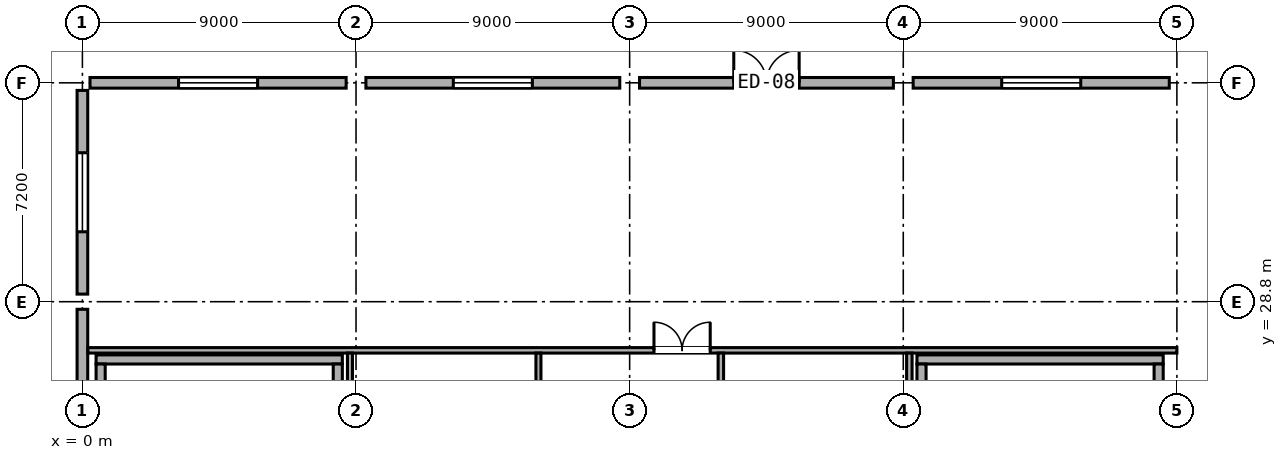
"""IFC4 building model, lengths in metres.
Left out: names, types, materials, properties, quantities, classifications, styles, units other than length and angle.
Written with IfcOpenShell. Run it as: python <this file> out.ifc"""

import sys

from ifc_helpers import new_model, si_unit, direction, frame, frame_2d, origin, origin_2d, place, context, subcontext, project, spatial, rectangle, hollow_rectangle, extrude, element, fill, save


model = new_model("IFC4")
c1 = context("Model", 3, precision=1e-05, world=origin(), true_north=direction((0.0, 1.0)))
c2 = subcontext(c1, "Body", "Model", "MODEL_VIEW")
j1 = project(units=[si_unit("LENGTHUNIT", "METRE"), si_unit("PLANEANGLEUNIT", "RADIAN")], contexts=[c1])
p1 = place(None, origin())
s1 = spatial("IfcSite", under=j1, at=p1, CompositionType="ELEMENT")
p2 = place(p1, origin())
s2 = spatial("IfcBuilding", under=s1, at=p2, CompositionType="ELEMENT")
p3 = place(p2, origin())
s3 = spatial("IfcBuildingStorey", under=s2, at=p3, CompositionType="ELEMENT", Elevation=0.0)
for number, where, z_axis, x_axis in (
    (1, (0.0, 28.8, 0.0), (0.0, 0.0, 1.0), (1.0, 0.0, 0.0)),
    (2, (0.0, 36.0, 0.0), (0.0, 0.0, 1.0), (1.0, 0.0, 0.0)),
):
    element("IfcColumn", number, at=place(p3, frame(where, z_axis=z_axis, x_axis=x_axis)), inside=s3, PredefinedType="COLUMN", context=c2, shape_type="SweptSolid", body=[
        extrude(hollow_rectangle(XDim=0.5, YDim=0.5, WallThickness=0.022, at=origin_2d()), origin(), (0.0, 0.0, 1.0), 4.8),
    ])
for number, where, z_axis, x_axis in (
    (3, (9.0, 28.8, 0.0), (0.0, 0.0, 1.0), (1.0, 0.0, 0.0)),
    (4, (9.0, 36.0, 0.0), (0.0, 0.0, 1.0), (1.0, 0.0, 0.0)),
    (5, (18.0, 28.8, 0.0), (0.0, 0.0, 1.0), (1.0, 0.0, 0.0)),
    (6, (18.0, 36.0, 0.0), (0.0, 0.0, 1.0), (1.0, 0.0, 0.0)),
    (7, (27.0, 28.8, 0.0), (0.0, 0.0, 1.0), (1.0, 0.0, 0.0)),
    (8, (27.0, 36.0, 0.0), (0.0, 0.0, 1.0), (1.0, 0.0, 0.0)),
):
    element("IfcColumn", number, at=place(p3, frame(where, z_axis=z_axis, x_axis=x_axis)), inside=s3, PredefinedType="COLUMN", context=c2, shape_type="SweptSolid", body=[
        extrude(hollow_rectangle(XDim=0.65, YDim=0.65, WallThickness=0.025, at=origin_2d()), origin(), (0.0, 0.0, 1.0), 4.8),
    ])
for number, where, z_axis, x_axis in (
    (9, (36.0, 28.8, 0.0), (0.0, 0.0, 1.0), (1.0, 0.0, 0.0)),
    (10, (36.0, 36.0, 0.0), (0.0, 0.0, 1.0), (1.0, 0.0, 0.0)),
):
    element("IfcColumn", number, at=place(p3, frame(where, z_axis=z_axis, x_axis=x_axis)), inside=s3, PredefinedType="COLUMN", context=c2, shape_type="SweptSolid", body=[
        extrude(hollow_rectangle(XDim=0.5, YDim=0.5, WallThickness=0.022, at=origin_2d()), origin(), (0.0, 0.0, 1.0), 4.8),
    ])
p4 = place(p3, frame((8.675, 36.0, 0.0), z_axis=(0.0, 0.0, 1.0), x_axis=(-1.0, 0.0, 0.0)))
e11 = element("IfcWall", 11, at=p4, inside=s3, PredefinedType="STANDARD", context=c2, shape_type="SweptSolid", body=[
    extrude(rectangle(XDim=8.425, YDim=0.35, at=frame_2d((4.212, 0.0))), origin(), (0.0, 0.0, 1.0), 4.055),
])
p5 = place(p4, frame((2.913, 0.0, 0.85)))
e12 = element("IfcOpeningElement", 12, at=p5, cuts=e11, PredefinedType="OPENING", context=c2, shape_type="SweptSolid", body=[
    extrude(rectangle(XDim=2.6, YDim=1.6, at=frame_2d((1.3, 0.8))), frame((0.0, 0.187, 0.0), z_axis=(0.0, -1.0, 0.0), x_axis=(1.0, 0.0, 0.0)), (0.0, 0.0, 1.0), 0.374),
])
p6 = place(p3, frame((17.675, 36.0, 0.0), z_axis=(0.0, 0.0, 1.0), x_axis=(-1.0, 0.0, 0.0)))
e13 = element("IfcWall", 13, at=p6, inside=s3, PredefinedType="STANDARD", context=c2, shape_type="SweptSolid", body=[
    extrude(rectangle(XDim=8.35, YDim=0.35, at=frame_2d((4.175, 0.0))), origin(), (0.0, 0.0, 1.0), 4.055),
])
p7 = place(p6, frame((2.875, 0.0, 0.85)))
e14 = element("IfcOpeningElement", 14, at=p7, cuts=e13, PredefinedType="OPENING", context=c2, shape_type="SweptSolid", body=[
    extrude(rectangle(XDim=2.6, YDim=1.6, at=frame_2d((1.3, 0.8))), frame((0.0, 0.187, 0.0), z_axis=(0.0, -1.0, 0.0), x_axis=(1.0, 0.0, 0.0)), (0.0, 0.0, 1.0), 0.374),
])
p8 = place(p3, frame((26.675, 36.0, 0.0), z_axis=(0.0, 0.0, 1.0), x_axis=(-1.0, 0.0, 0.0)))
e15 = element("IfcWall", 15, at=p8, inside=s3, PredefinedType="STANDARD", context=c2, shape_type="SweptSolid", body=[
    extrude(rectangle(XDim=8.35, YDim=0.35, at=frame_2d((4.175, 0.0))), origin(), (0.0, 0.0, 1.0), 4.055),
])
p9 = place(p8, frame((3.1, 0.0, 0.0)))
e16 = element("IfcOpeningElement", 16, at=p9, cuts=e15, PredefinedType="OPENING", context=c2, shape_type="SweptSolid", body=[
    extrude(rectangle(XDim=2.15, YDim=2.48, at=frame_2d((1.075, 1.24))), frame((0.0, 0.187, 0.0), z_axis=(0.0, -1.0, 0.0), x_axis=(1.0, 0.0, 0.0)), (0.0, 0.0, 1.0), 0.374),
])
p10 = place(p3, frame((35.75, 36.0, 0.0), z_axis=(0.0, 0.0, 1.0), x_axis=(-1.0, 0.0, 0.0)))
e17 = element("IfcWall", 17, at=p10, inside=s3, PredefinedType="STANDARD", context=c2, shape_type="SweptSolid", body=[
    extrude(rectangle(XDim=8.425, YDim=0.35, at=frame_2d((4.212, 0.0))), origin(), (0.0, 0.0, 1.0), 4.055),
])
p11 = place(p10, frame((2.913, 0.0, 0.85)))
e18 = element("IfcOpeningElement", 18, at=p11, cuts=e17, PredefinedType="OPENING", context=c2, shape_type="SweptSolid", body=[
    extrude(rectangle(XDim=2.6, YDim=1.6, at=frame_2d((1.3, 0.8))), frame((0.0, 0.187, 0.0), z_axis=(0.0, -1.0, 0.0), x_axis=(1.0, 0.0, 0.0)), (0.0, 0.0, 1.0), 0.374),
])
p12 = place(p3, frame((0.0, 21.85, 0.0), z_axis=(0.0, 0.0, 1.0), x_axis=(0.0, 1.0, 0.0)))
e19 = element("IfcWall", 19, at=p12, inside=s3, PredefinedType="STANDARD", context=c2, shape_type="SweptSolid", body=[
    extrude(rectangle(XDim=6.7, YDim=0.35, at=frame_2d((3.35, 0.0))), origin(), (0.0, 0.0, 1.0), 4.055),
])
p13 = place(p3, frame((0.0, 29.05, 0.0), z_axis=(0.0, 0.0, 1.0), x_axis=(0.0, 1.0, 0.0)))
e20 = element("IfcWall", 20, at=p13, inside=s3, PredefinedType="STANDARD", context=c2, shape_type="SweptSolid", body=[
    extrude(rectangle(XDim=6.7, YDim=0.35, at=frame_2d((3.35, 0.0))), origin(), (0.0, 0.0, 1.0), 4.055),
])
p14 = place(p13, frame((2.05, 0.0, 0.85)))
e21 = element("IfcOpeningElement", 21, at=p14, cuts=e20, PredefinedType="OPENING", context=c2, shape_type="SweptSolid", body=[
    extrude(rectangle(XDim=2.6, YDim=1.6, at=frame_2d((1.3, 0.8))), frame((0.0, 0.187, 0.0), z_axis=(0.0, -1.0, 0.0), x_axis=(1.0, 0.0, 0.0)), (0.0, 0.0, 1.0), 0.374),
])
p15 = place(p3, frame((0.45, 26.9, 0.0), z_axis=(0.0, 0.0, 1.0), x_axis=(1.0, 0.0, 0.0)))
e22 = element("IfcWall", 22, at=p15, inside=s3, PredefinedType="SHEAR", context=c2, shape_type="SweptSolid", body=[
    extrude(rectangle(XDim=8.1, YDim=0.3, at=frame_2d((4.05, 0.0))), origin(), (0.0, 0.0, 1.0), 4.555),
])
for number, where, z_axis, x_axis in (
    (23, (0.6, 22.95, 0.0), (0.0, 0.0, 1.0), (0.0, 1.0, 0.0)),
    (24, (8.4, 22.95, 0.0), (0.0, 0.0, 1.0), (0.0, 1.0, 0.0)),
):
    element("IfcWall", number, at=place(p3, frame(where, z_axis=z_axis, x_axis=x_axis)), inside=s3, PredefinedType="SHEAR", context=c2, shape_type="SweptSolid", body=[
        extrude(rectangle(XDim=3.8, YDim=0.3, at=frame_2d((1.9, 0.0))), origin(), (0.0, 0.0, 1.0), 4.555),
    ])
p16 = place(p3, frame((27.45, 26.9, 0.0), z_axis=(0.0, 0.0, 1.0), x_axis=(1.0, 0.0, 0.0)))
e25 = element("IfcWall", 25, at=p16, inside=s3, PredefinedType="SHEAR", context=c2, shape_type="SweptSolid", body=[
    extrude(rectangle(XDim=8.1, YDim=0.3, at=frame_2d((4.05, 0.0))), origin(), (0.0, 0.0, 1.0), 4.555),
])
for number, where, z_axis, x_axis in (
    (26, (27.6, 22.95, 0.0), (0.0, 0.0, 1.0), (0.0, 1.0, 0.0)),
    (27, (35.4, 22.95, 0.0), (0.0, 0.0, 1.0), (0.0, 1.0, 0.0)),
):
    element("IfcWall", number, at=place(p3, frame(where, z_axis=z_axis, x_axis=x_axis)), inside=s3, PredefinedType="SHEAR", context=c2, shape_type="SweptSolid", body=[
        extrude(rectangle(XDim=3.8, YDim=0.3, at=frame_2d((1.9, 0.0))), origin(), (0.0, 0.0, 1.0), 4.555),
    ])
p17 = place(p3, frame((0.18, 27.2, 0.0), z_axis=(0.0, 0.0, 1.0), x_axis=(1.0, 0.0, 0.0)))
e28 = element("IfcWall", 28, at=p17, inside=s3, PredefinedType="PARTITIONING", context=c2, shape_type="SweptSolid", body=[
    extrude(rectangle(XDim=35.82, YDim=0.18, at=frame_2d((17.91, 0.0))), origin(), (0.0, 0.0, 1.0), 4.555),
])
p18 = place(p17, frame((18.62, 0.0, 0.0)))
e29 = element("IfcOpeningElement", 29, at=p18, cuts=e28, PredefinedType="OPENING", context=c2, shape_type="SweptSolid", body=[
    extrude(rectangle(XDim=1.85, YDim=2.12, at=frame_2d((0.925, 1.06))), frame((0.0, 0.102, 0.0), z_axis=(0.0, -1.0, 0.0), x_axis=(1.0, 0.0, 0.0)), (0.0, 0.0, 1.0), 0.204),
])
p19 = place(p3, frame((8.8, 22.69, 0.0), z_axis=(0.0, 0.0, 1.0), x_axis=(0.0, 1.0, 0.0)))
e30 = element("IfcWall", 30, at=p19, inside=s3, PredefinedType="PARTITIONING", context=c2, shape_type="SweptSolid", body=[
    extrude(rectangle(XDim=4.42, YDim=0.165, at=frame_2d((2.21, 0.0))), origin(), (0.0, 0.0, 1.0), 3.835),
])
p20 = place(p3, frame((15.0, 22.69, 0.0), z_axis=(0.0, 0.0, 1.0), x_axis=(0.0, 1.0, 0.0)))
e31 = element("IfcWall", 31, at=p20, inside=s3, PredefinedType="PARTITIONING", context=c2, shape_type="SweptSolid", body=[
    extrude(rectangle(XDim=4.42, YDim=0.165, at=frame_2d((2.21, 0.0))), origin(), (0.0, 0.0, 1.0), 4.555),
])
p21 = place(p3, frame((21.0, 22.69, 0.0), z_axis=(0.0, 0.0, 1.0), x_axis=(0.0, 1.0, 0.0)))
e32 = element("IfcWall", 32, at=p21, inside=s3, PredefinedType="PARTITIONING", context=c2, shape_type="SweptSolid", body=[
    extrude(rectangle(XDim=4.42, YDim=0.18, at=frame_2d((2.21, 0.0))), origin(), (0.0, 0.0, 1.0), 4.555),
])
p22 = place(p3, frame((27.2, 22.69, 0.0), z_axis=(0.0, 0.0, 1.0), x_axis=(0.0, 1.0, 0.0)))
e33 = element("IfcWall", 33, at=p22, inside=s3, PredefinedType="PARTITIONING", context=c2, shape_type="SweptSolid", body=[
    extrude(rectangle(XDim=4.42, YDim=0.18, at=frame_2d((2.21, 0.0))), origin(), (0.0, 0.0, 1.0), 3.835),
])
p23 = place(p5, origin())
e34 = element("IfcWindow", 34, at=p23, inside=s3, PartitioningType="DOUBLE_PANEL_VERTICAL", PredefinedType="WINDOW", context=c2, shape_type="SweptSolid", body=[
    extrude(rectangle(XDim=2.6, YDim=1.6, at=frame_2d((1.3, 0.8))), frame((0.0, 0.03, 0.0), z_axis=(0.0, -1.0, 0.0), x_axis=(1.0, 0.0, 0.0)), (0.0, 0.0, 1.0), 0.06),
])
fill(e12, e34)
p24 = place(p7, origin())
e35 = element("IfcWindow", 35, at=p24, inside=s3, PartitioningType="DOUBLE_PANEL_VERTICAL", PredefinedType="WINDOW", context=c2, shape_type="SweptSolid", body=[
    extrude(rectangle(XDim=2.6, YDim=1.6, at=frame_2d((1.3, 0.8))), frame((0.0, 0.03, 0.0), z_axis=(0.0, -1.0, 0.0), x_axis=(1.0, 0.0, 0.0)), (0.0, 0.0, 1.0), 0.06),
])
fill(e14, e35)
p25 = place(p9, frame((2.15, 0.0, 0.0), z_axis=(0.0, 0.0, 1.0), x_axis=(-1.0, 0.0, 0.0)))
e36 = element("IfcDoor", 36, at=p25, inside=s3, OperationType="DOUBLE_DOOR_SINGLE_SWING", PredefinedType="DOOR", context=c2, shape_type="SweptSolid", body=[
    extrude(rectangle(XDim=2.15, YDim=2.48, at=frame_2d((1.075, 1.24))), frame((0.0, 0.025, 0.0), z_axis=(0.0, -1.0, 0.0), x_axis=(1.0, 0.0, 0.0)), (0.0, 0.0, 1.0), 0.05),
])
fill(e16, e36)
p26 = place(p11, origin())
e37 = element("IfcWindow", 37, at=p26, inside=s3, PartitioningType="DOUBLE_PANEL_VERTICAL", PredefinedType="WINDOW", context=c2, shape_type="SweptSolid", body=[
    extrude(rectangle(XDim=2.6, YDim=1.6, at=frame_2d((1.3, 0.8))), frame((0.0, 0.03, 0.0), z_axis=(0.0, -1.0, 0.0), x_axis=(1.0, 0.0, 0.0)), (0.0, 0.0, 1.0), 0.06),
])
fill(e18, e37)
p27 = place(p14, origin())
e38 = element("IfcWindow", 38, at=p27, inside=s3, PartitioningType="DOUBLE_PANEL_VERTICAL", PredefinedType="WINDOW", context=c2, shape_type="SweptSolid", body=[
    extrude(rectangle(XDim=2.6, YDim=1.6, at=frame_2d((1.3, 0.8))), frame((0.0, 0.03, 0.0), z_axis=(0.0, -1.0, 0.0), x_axis=(1.0, 0.0, 0.0)), (0.0, 0.0, 1.0), 0.06),
])
fill(e21, e38)
p28 = place(p18, origin())
e39 = element("IfcDoor", 39, at=p28, inside=s3, OperationType="DOUBLE_DOOR_SINGLE_SWING", PredefinedType="DOOR", context=c2, shape_type="SweptSolid", body=[
    extrude(rectangle(XDim=1.85, YDim=2.12, at=frame_2d((0.925, 1.06))), frame((0.0, 0.025, 0.0), z_axis=(0.0, -1.0, 0.0), x_axis=(1.0, 0.0, 0.0)), (0.0, 0.0, 1.0), 0.05),
])
fill(e29, e39)
save(model, sys.argv[1])
